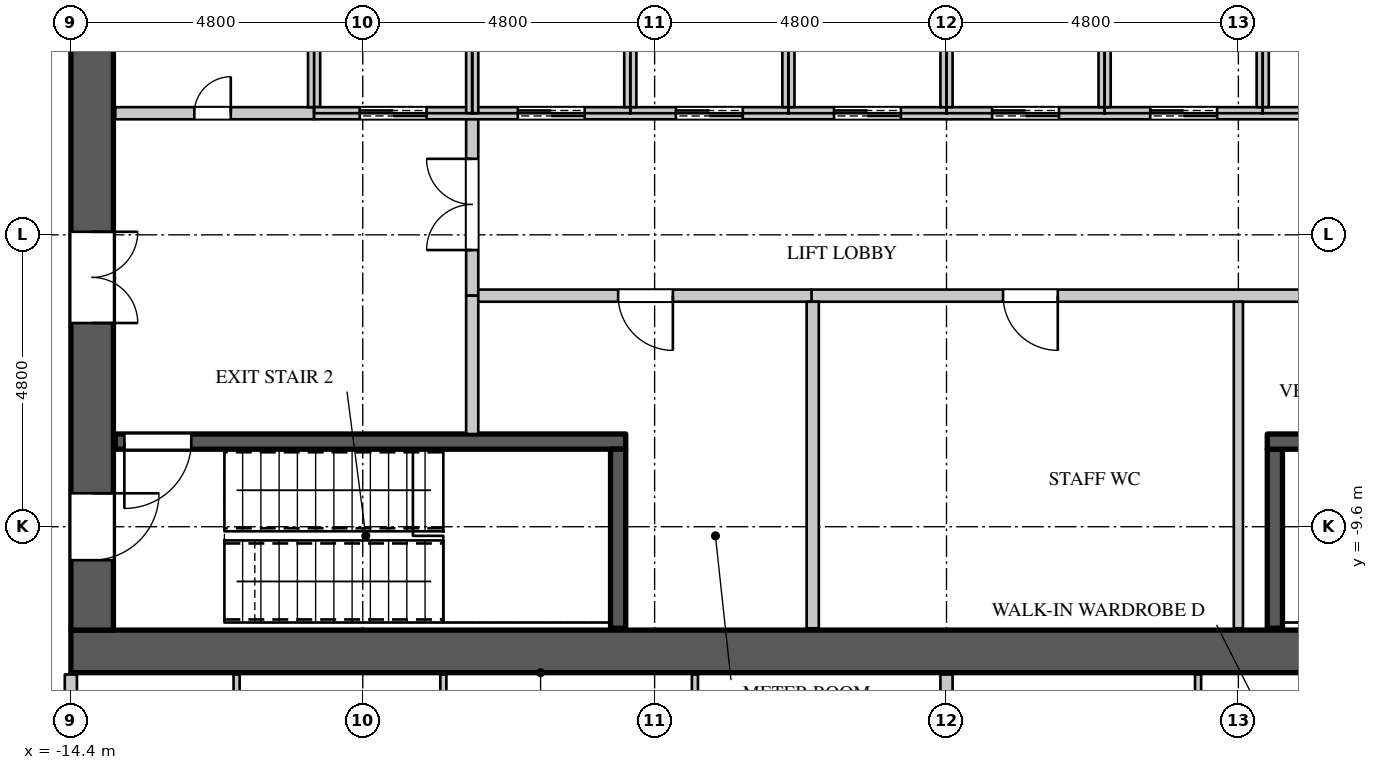
"""IFC4 building model, lengths in metres.
Left out: names, types, materials, properties, quantities, classifications, styles, units other than length and angle.
Written with IfcOpenShell. Run it as: python <this file> out.ifc"""

import sys

from ifc_helpers import new_model, si_unit, direction, frame, frame_2d, origin, place, context, subcontext, project, spatial, rectangle, extrude, element, fill, save


model = new_model("IFC4")
c1 = context("Model", 3, precision=1e-05, world=origin(), true_north=direction((0.0, 1.0)))
c2 = subcontext(c1, "Body", "Model", "MODEL_VIEW")
j1 = project(units=[si_unit("LENGTHUNIT", "METRE"), si_unit("PLANEANGLEUNIT", "RADIAN")], contexts=[c1])
p1 = place(None, origin())
s1 = spatial("IfcSite", under=j1, at=p1, CompositionType="ELEMENT")
p2 = place(p1, origin())
s2 = spatial("IfcBuilding", under=s1, at=p2, CompositionType="ELEMENT")
p3 = place(p2, frame((0.0, 0.0, 166.5)))
s3 = spatial("IfcBuildingStorey", under=s2, at=p3, CompositionType="ELEMENT", Elevation=166.5)
p4 = place(p3, frame((-14.4, -11.65, 0.0), z_axis=(0.0, 0.0, 1.0), x_axis=(1.0, 0.0, 0.0)))
e1 = element("IfcWall", 1, at=p4, inside=s3, PredefinedType="SHEAR", context=c2, shape_type="SweptSolid", body=[
    extrude(rectangle(XDim=28.8, YDim=0.7, at=frame_2d((14.4, 0.0))), origin(), (0.0, 0.0, 1.0), 4.2),
])
p5 = place(p3, frame((-14.05, -11.3, 0.0), z_axis=(0.0, 0.0, 1.0), x_axis=(0.0, 1.0, 0.0)))
e2 = element("IfcWall", 2, at=p5, inside=s3, PredefinedType="SHEAR", context=c2, shape_type="SweptSolid", body=[
    extrude(rectangle(XDim=22.6, YDim=0.7, at=frame_2d((11.3, 0.0))), origin(), (0.0, 0.0, 1.0), 4.2),
])
p6 = place(p5, frame((20.35, 0.0, 0.0)))
e3 = element("IfcOpeningElement", 3, at=p6, cuts=e2, PredefinedType="OPENING", context=c2, shape_type="SweptSolid", body=[
    extrude(rectangle(XDim=1.1, YDim=2.2, at=frame_2d((0.55, 1.1))), frame((0.0, 0.36, 0.0), z_axis=(0.0, -1.0, 0.0), x_axis=(1.0, 0.0, 0.0)), (0.0, 0.0, 1.0), 0.72),
])
p7 = place(p5, frame((1.15, 0.0, 0.0)))
e4 = element("IfcOpeningElement", 4, at=p7, cuts=e2, PredefinedType="OPENING", context=c2, shape_type="SweptSolid", body=[
    extrude(rectangle(XDim=1.1, YDim=2.2, at=frame_2d((0.55, 1.1))), frame((0.0, 0.36, 0.0), z_axis=(0.0, -1.0, 0.0), x_axis=(1.0, 0.0, 0.0)), (0.0, 0.0, 1.0), 0.72),
])
p8 = place(p5, frame((16.05, 0.0, 0.0)))
e5 = element("IfcOpeningElement", 5, at=p8, cuts=e2, PredefinedType="OPENING", context=c2, shape_type="SweptSolid", body=[
    extrude(rectangle(XDim=1.5, YDim=2.4, at=frame_2d((0.75, 1.2))), frame((0.0, 0.36, 0.0), z_axis=(0.0, -1.0, 0.0), x_axis=(1.0, 0.0, 0.0)), (0.0, 0.0, 1.0), 0.72),
])
p9 = place(p5, frame((5.05, 0.0, 0.0)))
e6 = element("IfcOpeningElement", 6, at=p9, cuts=e2, PredefinedType="OPENING", context=c2, shape_type="SweptSolid", body=[
    extrude(rectangle(XDim=1.5, YDim=2.4, at=frame_2d((0.75, 1.2))), frame((0.0, 0.36, 0.0), z_axis=(0.0, -1.0, 0.0), x_axis=(1.0, 0.0, 0.0)), (0.0, 0.0, 1.0), 0.72),
])
p10 = place(p3, frame((-14.4, -14.3, 0.0), z_axis=(0.0, 0.0, 1.0), x_axis=(0.0, 1.0, 0.0)))
e7 = element("IfcWall", 7, at=p10, inside=s3, PredefinedType="PARTITIONING", context=c2, shape_type="SweptSolid", body=[
    extrude(rectangle(XDim=2.27, YDim=0.2, at=frame_2d((1.135, 0.0))), origin(), (0.0, 0.0, 1.0), 3.95),
])
p11 = place(p3, frame((-7.8, -5.8, 0.0), z_axis=(0.0, 0.0, 1.0), x_axis=(0.0, 1.0, 0.0)))
e8 = element("IfcWall", 8, at=p11, inside=s3, PredefinedType="PARTITIONING", context=c2, shape_type="SweptSolid", body=[
    extrude(rectangle(XDim=3.0, YDim=0.2, at=frame_2d((1.5, 0.0))), origin(), (0.0, 0.0, 1.0), 3.95),
])
p12 = place(p11, frame((0.75, 0.0, 0.0)))
e9 = element("IfcOpeningElement", 9, at=p12, cuts=e8, PredefinedType="OPENING", context=c2, shape_type="SweptSolid", body=[
    extrude(rectangle(XDim=1.5, YDim=2.4, at=frame_2d((0.75, 1.2))), frame((0.0, 0.11, 0.0), z_axis=(0.0, -1.0, 0.0), x_axis=(1.0, 0.0, 0.0)), (0.0, 0.0, 1.0), 0.22),
])
p13 = place(p3, frame((-2.22, -5.8, 0.0), z_axis=(0.0, 0.0, 1.0), x_axis=(1.0, 0.0, 0.0)))
e10 = element("IfcWall", 10, at=p13, inside=s3, PredefinedType="PARTITIONING", context=c2, shape_type="SweptSolid", body=[
    extrude(rectangle(XDim=15.89, YDim=0.2, at=frame_2d((7.945, 0.0))), origin(), (0.0, 0.0, 1.0), 3.95),
])
p14 = place(p13, frame((3.15, 0.0, 0.0)))
e11 = element("IfcOpeningElement", 11, at=p14, cuts=e10, PredefinedType="OPENING", context=c2, shape_type="SweptSolid", body=[
    extrude(rectangle(XDim=0.9, YDim=2.2, at=frame_2d((0.45, 1.1))), frame((0.0, 0.11, 0.0), z_axis=(0.0, -1.0, 0.0), x_axis=(1.0, 0.0, 0.0)), (0.0, 0.0, 1.0), 0.22),
])
p15 = place(p13, frame((8.5, 0.0, 0.0)))
e12 = element("IfcOpeningElement", 12, at=p15, cuts=e10, PredefinedType="OPENING", context=c2, shape_type="SweptSolid", body=[
    extrude(rectangle(XDim=0.9, YDim=2.2, at=frame_2d((0.45, 1.1))), frame((0.0, 0.11, 0.0), z_axis=(0.0, -1.0, 0.0), x_axis=(1.0, 0.0, 0.0)), (0.0, 0.0, 1.0), 0.22),
])
p16 = place(p13, frame((12.8, 0.0, 0.0)))
e13 = element("IfcOpeningElement", 13, at=p16, cuts=e10, PredefinedType="OPENING", context=c2, shape_type="SweptSolid", body=[
    extrude(rectangle(XDim=0.9, YDim=2.2, at=frame_2d((0.45, 1.1))), frame((0.0, 0.11, 0.0), z_axis=(0.0, -1.0, 0.0), x_axis=(1.0, 0.0, 0.0)), (0.0, 0.0, 1.0), 0.22),
])
p17 = place(p3, frame((4.8, -11.27, 0.0), z_axis=(0.0, 0.0, 1.0), x_axis=(0.0, 1.0, 0.0)))
e14 = element("IfcWall", 14, at=p17, inside=s3, PredefinedType="PARTITIONING", context=c2, shape_type="SweptSolid", body=[
    extrude(rectangle(XDim=5.37, YDim=0.15, at=frame_2d((2.685, 0.0))), origin(), (0.0, 0.0, 1.0), 3.95),
])
p18 = place(p3, frame((0.0, -24.055, 0.0), z_axis=(0.0, 0.0, 1.0), x_axis=(0.0, 1.0, 0.0)))
e15 = element("IfcWall", 15, at=p18, inside=s3, PredefinedType="PARTITIONING", context=c2, shape_type="SweptSolid", body=[
    extrude(rectangle(XDim=12.025, YDim=0.2, at=frame_2d((6.012, 0.0))), origin(), (0.0, 0.0, 1.0), 3.95),
])
p19 = place(p3, frame((-13.67, -2.8, 0.0), z_axis=(0.0, 0.0, 1.0), x_axis=(1.0, 0.0, 0.0)))
e16 = element("IfcWall", 16, at=p19, inside=s3, PredefinedType="PARTITIONING", context=c2, shape_type="SweptSolid", body=[
    extrude(rectangle(XDim=3.27, YDim=0.2, at=frame_2d((1.635, 0.0))), origin(), (0.0, 0.0, 1.0), 3.95),
])
p20 = place(p19, frame((1.3, 0.0, 0.0)))
e17 = element("IfcOpeningElement", 17, at=p20, cuts=e16, PredefinedType="OPENING", context=c2, shape_type="SweptSolid", body=[
    extrude(rectangle(XDim=0.6, YDim=2.0, at=frame_2d((0.3, 1.0))), frame((0.0, 0.11, 0.0), z_axis=(0.0, -1.0, 0.0), x_axis=(1.0, 0.0, 0.0)), (0.0, 0.0, 1.0), 0.22),
])
p21 = place(p3, frame((-7.8, -8.075, 0.0), z_axis=(0.0, 0.0, 1.0), x_axis=(0.0, 1.0, 0.0)))
e18 = element("IfcWall", 18, at=p21, inside=s3, PredefinedType="PARTITIONING", context=c2, shape_type="SweptSolid", body=[
    extrude(rectangle(XDim=2.275, YDim=0.2, at=frame_2d((1.137, 0.0))), origin(), (0.0, 0.0, 1.0), 3.95),
])
p22 = place(p3, frame((-7.7, -5.8, 0.0), z_axis=(0.0, 0.0, 1.0), x_axis=(1.0, 0.0, 0.0)))
e19 = element("IfcWall", 19, at=p22, inside=s3, PredefinedType="PARTITIONING", context=c2, shape_type="SweptSolid", body=[
    extrude(rectangle(XDim=5.48, YDim=0.2, at=frame_2d((2.74, 0.0))), origin(), (0.0, 0.0, 1.0), 3.95),
])
p23 = place(p22, frame((2.3, 0.0, 0.0)))
e20 = element("IfcOpeningElement", 20, at=p23, cuts=e19, PredefinedType="OPENING", context=c2, shape_type="SweptSolid", body=[
    extrude(rectangle(XDim=0.9, YDim=2.2, at=frame_2d((0.45, 1.1))), frame((0.0, 0.11, 0.0), z_axis=(0.0, -1.0, 0.0), x_axis=(1.0, 0.0, 0.0)), (0.0, 0.0, 1.0), 0.22),
])
p24 = place(p3, frame((-2.2, -11.27, 0.0), z_axis=(0.0, 0.0, 1.0), x_axis=(0.0, 1.0, 0.0)))
e21 = element("IfcWall", 21, at=p24, inside=s3, PredefinedType="PARTITIONING", context=c2, shape_type="SweptSolid", body=[
    extrude(rectangle(XDim=5.37, YDim=0.2, at=frame_2d((2.685, 0.0))), origin(), (0.0, 0.0, 1.0), 3.95),
])
p25 = place(p3, frame((-10.4, -2.7, 0.0), z_axis=(0.0, 0.0, 1.0), x_axis=(0.0, 1.0, 0.0)))
e22 = element("IfcWall", 22, at=p25, inside=s3, PredefinedType="PARTITIONING", context=c2, shape_type="SweptSolid", body=[
    extrude(rectangle(XDim=2.7, YDim=0.2, at=frame_2d((1.35, 0.0))), origin(), (0.0, 0.0, 1.0), 3.95),
])
p26 = place(p3, frame((-10.4, -2.8, 0.0), z_axis=(0.0, 0.0, 1.0), x_axis=(1.0, 0.0, 0.0)))
e23 = element("IfcWall", 23, at=p26, inside=s3, PredefinedType="PARTITIONING", context=c2, shape_type="SweptSolid", body=[
    extrude(rectangle(XDim=18.2, YDim=0.2, at=frame_2d((9.1, 0.0))), origin(), (0.0, 0.0, 1.0), 3.95),
])
p27 = place(p26, frame((0.75, 0.0, 0.0)))
e24 = element("IfcOpeningElement", 24, at=p27, cuts=e23, PredefinedType="OPENING", context=c2, shape_type="SweptSolid", body=[
    extrude(rectangle(XDim=1.1, YDim=2.2, at=frame_2d((0.55, 1.1))), frame((0.0, 0.11, 0.0), z_axis=(0.0, -1.0, 0.0), x_axis=(1.0, 0.0, 0.0)), (0.0, 0.0, 1.0), 0.22),
])
p28 = place(p26, frame((3.35, 0.0, 0.0)))
e25 = element("IfcOpeningElement", 25, at=p28, cuts=e23, PredefinedType="OPENING", context=c2, shape_type="SweptSolid", body=[
    extrude(rectangle(XDim=1.1, YDim=2.2, at=frame_2d((0.55, 1.1))), frame((0.0, 0.11, 0.0), z_axis=(0.0, -1.0, 0.0), x_axis=(1.0, 0.0, 0.0)), (0.0, 0.0, 1.0), 0.22),
])
p29 = place(p26, frame((5.95, 0.0, 0.0)))
e26 = element("IfcOpeningElement", 26, at=p29, cuts=e23, PredefinedType="OPENING", context=c2, shape_type="SweptSolid", body=[
    extrude(rectangle(XDim=1.1, YDim=2.2, at=frame_2d((0.55, 1.1))), frame((0.0, 0.11, 0.0), z_axis=(0.0, -1.0, 0.0), x_axis=(1.0, 0.0, 0.0)), (0.0, 0.0, 1.0), 0.22),
])
p30 = place(p26, frame((8.55, 0.0, 0.0)))
e27 = element("IfcOpeningElement", 27, at=p30, cuts=e23, PredefinedType="OPENING", context=c2, shape_type="SweptSolid", body=[
    extrude(rectangle(XDim=1.1, YDim=2.2, at=frame_2d((0.55, 1.1))), frame((0.0, 0.11, 0.0), z_axis=(0.0, -1.0, 0.0), x_axis=(1.0, 0.0, 0.0)), (0.0, 0.0, 1.0), 0.22),
])
p31 = place(p26, frame((11.15, 0.0, 0.0)))
e28 = element("IfcOpeningElement", 28, at=p31, cuts=e23, PredefinedType="OPENING", context=c2, shape_type="SweptSolid", body=[
    extrude(rectangle(XDim=1.1, YDim=2.2, at=frame_2d((0.55, 1.1))), frame((0.0, 0.11, 0.0), z_axis=(0.0, -1.0, 0.0), x_axis=(1.0, 0.0, 0.0)), (0.0, 0.0, 1.0), 0.22),
])
p32 = place(p26, frame((13.75, 0.0, 0.0)))
e29 = element("IfcOpeningElement", 29, at=p32, cuts=e23, PredefinedType="OPENING", context=c2, shape_type="SweptSolid", body=[
    extrude(rectangle(XDim=1.1, YDim=2.2, at=frame_2d((0.55, 1.1))), frame((0.0, 0.11, 0.0), z_axis=(0.0, -1.0, 0.0), x_axis=(1.0, 0.0, 0.0)), (0.0, 0.0, 1.0), 0.22),
])
p33 = place(p26, frame((16.35, 0.0, 0.0)))
e30 = element("IfcOpeningElement", 30, at=p33, cuts=e23, PredefinedType="OPENING", context=c2, shape_type="SweptSolid", body=[
    extrude(rectangle(XDim=1.1, YDim=2.2, at=frame_2d((0.55, 1.1))), frame((0.0, 0.11, 0.0), z_axis=(0.0, -1.0, 0.0), x_axis=(1.0, 0.0, 0.0)), (0.0, 0.0, 1.0), 0.22),
])
p34 = place(p3, frame((-7.8, -2.8, 0.0), z_axis=(0.0, 0.0, 1.0), x_axis=(0.0, 1.0, 0.0)))
e31 = element("IfcWall", 31, at=p34, inside=s3, PredefinedType="PARTITIONING", context=c2, shape_type="SweptSolid", body=[
    extrude(rectangle(XDim=2.8, YDim=0.2, at=frame_2d((1.4, 0.0))), origin(), (0.0, 0.0, 1.0), 3.95),
])
for number, where, z_axis, x_axis in (
    (32, (-5.2, -2.7, 0.0), (0.0, 0.0, 1.0), (0.0, 1.0, 0.0)),
    (33, (-2.6, -2.7, 0.0), (0.0, 0.0, 1.0), (0.0, 1.0, 0.0)),
    (34, (0.0, -2.7, 0.0), (0.0, 0.0, 1.0), (0.0, 1.0, 0.0)),
    (35, (2.6, -2.7, 0.0), (0.0, 0.0, 1.0), (0.0, 1.0, 0.0)),
    (36, (5.2, -2.7, 0.0), (0.0, 0.0, 1.0), (0.0, 1.0, 0.0)),
):
    element("IfcWall", number, at=place(p3, frame(where, z_axis=z_axis, x_axis=x_axis)), inside=s3, PredefinedType="PARTITIONING", context=c2, shape_type="SweptSolid", body=[
        extrude(rectangle(XDim=2.6, YDim=0.2, at=frame_2d((1.3, 0.0))), origin(), (0.0, 0.0, 1.0), 3.95),
    ])
p35 = place(p3, frame((-13.67, -8.2, 0.0), z_axis=(0.0, 0.0, 1.0), x_axis=(1.0, 0.0, 0.0)))
e37 = element("IfcWall", 37, at=p35, inside=s3, PredefinedType="SHEAR", context=c2, shape_type="SweptSolid", body=[
    extrude(rectangle(XDim=8.395, YDim=0.25, at=frame_2d((4.198, 0.0))), origin(), (0.0, 0.0, 1.0), 3.95),
])
p36 = place(p35, frame((0.15, 0.0, 0.0)))
e38 = element("IfcOpeningElement", 38, at=p36, cuts=e37, PredefinedType="OPENING", context=c2, shape_type="SweptSolid", body=[
    extrude(rectangle(XDim=1.1, YDim=2.2, at=frame_2d((0.55, 1.1))), frame((0.0, 0.135, 0.0), z_axis=(0.0, -1.0, 0.0), x_axis=(1.0, 0.0, 0.0)), (0.0, 0.0, 1.0), 0.27),
])
for number, where, z_axis, x_axis in (
    (39, (-5.4, -11.27, 0.0), (0.0, 0.0, 1.0), (0.0, 1.0, 0.0)),
    (40, (5.4, -11.27, 0.0), (0.0, 0.0, 1.0), (0.0, 1.0, 0.0)),
):
    element("IfcWall", number, at=place(p3, frame(where, z_axis=z_axis, x_axis=x_axis)), inside=s3, PredefinedType="SHEAR", context=c2, shape_type="SweptSolid", body=[
        extrude(rectangle(XDim=2.945, YDim=0.25, at=frame_2d((1.473, 0.0))), origin(), (0.0, 0.0, 1.0), 3.95),
    ])
p37 = place(p3, frame((5.275, -8.2, 0.0), z_axis=(0.0, 0.0, 1.0), x_axis=(1.0, 0.0, 0.0)))
e41 = element("IfcWall", 41, at=p37, inside=s3, PredefinedType="SHEAR", context=c2, shape_type="SweptSolid", body=[
    extrude(rectangle(XDim=8.395, YDim=0.25, at=frame_2d((4.198, 0.0))), origin(), (0.0, 0.0, 1.0), 3.95),
])
p38 = place(p3, frame((-11.675, -14.925, 0.0), z_axis=(0.0, 0.0, 1.0), x_axis=(0.0, 1.0, 0.0)))
e42 = element("IfcWall", 42, at=p38, inside=s3, PredefinedType="PARTITIONING", context=c2, shape_type="SweptSolid", body=[
    extrude(rectangle(XDim=2.895, YDim=0.1, at=frame_2d((1.448, 0.0))), origin(), (0.0, 0.0, 1.0), 3.95),
])
p39 = place(p38, frame((0.95, 0.0, 0.0)))
e43 = element("IfcOpeningElement", 43, at=p39, cuts=e42, PredefinedType="OPENING", context=c2, shape_type="SweptSolid", body=[
    extrude(rectangle(XDim=0.9, YDim=2.2, at=frame_2d((0.45, 1.1))), frame((0.0, 0.06, 0.0), z_axis=(0.0, -1.0, 0.0), x_axis=(1.0, 0.0, 0.0)), (0.0, 0.0, 1.0), 0.12),
])
p40 = place(p3, frame((-8.274, -14.98, 0.0), z_axis=(0.0, 0.0, 1.0), x_axis=(0.0, 1.0, 0.0)))
e44 = element("IfcWall", 44, at=p40, inside=s3, PredefinedType="PARTITIONING", context=c2, shape_type="SweptSolid", body=[
    extrude(rectangle(XDim=2.95, YDim=0.1, at=frame_2d((1.475, 0.0))), origin(), (0.0, 0.0, 1.0), 3.95),
])
for number, where, z_axis, x_axis in (
    (45, (-4.137, -17.325, 0.0), (0.0, 0.0, 1.0), (0.0, 1.0, 0.0)),
    (46, (4.137, -17.325, 0.0), (0.0, 0.0, 1.0), (0.0, 1.0, 0.0)),
):
    element("IfcWall", number, at=place(p3, frame(where, z_axis=z_axis, x_axis=x_axis)), inside=s3, PredefinedType="PARTITIONING", context=c2, shape_type="SweptSolid", body=[
        extrude(rectangle(XDim=5.295, YDim=0.1, at=frame_2d((2.647, 0.0))), origin(), (0.0, 0.0, 1.0), 3.35),
    ])
p41 = place(p20, origin())
e47 = element("IfcDoor", 47, at=p41, inside=s3, OperationType="SINGLE_SWING_RIGHT", PredefinedType="DOOR", context=c2, shape_type="SweptSolid", body=[
    extrude(rectangle(XDim=0.6, YDim=2.0, at=frame_2d((0.3, 1.0))), frame((0.0, 0.025, 0.0), z_axis=(0.0, -1.0, 0.0), x_axis=(1.0, 0.0, 0.0)), (0.0, 0.0, 1.0), 0.05),
])
fill(e17, e47)
p42 = place(p23, origin())
e48 = element("IfcDoor", 48, at=p42, inside=s3, OperationType="SINGLE_SWING_LEFT", PredefinedType="DOOR", context=c2, shape_type="SweptSolid", body=[
    extrude(rectangle(XDim=0.9, YDim=2.2, at=frame_2d((0.45, 1.1))), frame((0.0, 0.025, 0.0), z_axis=(0.0, -1.0, 0.0), x_axis=(1.0, 0.0, 0.0)), (0.0, 0.0, 1.0), 0.05),
])
fill(e20, e48)
p43 = place(p14, origin())
e49 = element("IfcDoor", 49, at=p43, inside=s3, OperationType="SINGLE_SWING_LEFT", PredefinedType="DOOR", context=c2, shape_type="SweptSolid", body=[
    extrude(rectangle(XDim=0.9, YDim=2.2, at=frame_2d((0.45, 1.1))), frame((0.0, 0.025, 0.0), z_axis=(0.0, -1.0, 0.0), x_axis=(1.0, 0.0, 0.0)), (0.0, 0.0, 1.0), 0.05),
])
fill(e11, e49)
p44 = place(p27, origin())
e50 = element("IfcDoor", 50, at=p44, inside=s3, OperationType="DOUBLE_DOOR_SLIDING", PredefinedType="DOOR", context=c2, shape_type="SweptSolid", body=[
    extrude(rectangle(XDim=1.1, YDim=2.2, at=frame_2d((0.55, 1.1))), frame((0.0, 0.025, 0.0), z_axis=(0.0, -1.0, 0.0), x_axis=(1.0, 0.0, 0.0)), (0.0, 0.0, 1.0), 0.05),
])
fill(e24, e50)
p45 = place(p28, origin())
e51 = element("IfcDoor", 51, at=p45, inside=s3, OperationType="DOUBLE_DOOR_SLIDING", PredefinedType="DOOR", context=c2, shape_type="SweptSolid", body=[
    extrude(rectangle(XDim=1.1, YDim=2.2, at=frame_2d((0.55, 1.1))), frame((0.0, 0.025, 0.0), z_axis=(0.0, -1.0, 0.0), x_axis=(1.0, 0.0, 0.0)), (0.0, 0.0, 1.0), 0.05),
])
fill(e25, e51)
p46 = place(p29, origin())
e52 = element("IfcDoor", 52, at=p46, inside=s3, OperationType="DOUBLE_DOOR_SLIDING", PredefinedType="DOOR", context=c2, shape_type="SweptSolid", body=[
    extrude(rectangle(XDim=1.1, YDim=2.2, at=frame_2d((0.55, 1.1))), frame((0.0, 0.025, 0.0), z_axis=(0.0, -1.0, 0.0), x_axis=(1.0, 0.0, 0.0)), (0.0, 0.0, 1.0), 0.05),
])
fill(e26, e52)
p47 = place(p30, origin())
e53 = element("IfcDoor", 53, at=p47, inside=s3, OperationType="DOUBLE_DOOR_SLIDING", PredefinedType="DOOR", context=c2, shape_type="SweptSolid", body=[
    extrude(rectangle(XDim=1.1, YDim=2.2, at=frame_2d((0.55, 1.1))), frame((0.0, 0.025, 0.0), z_axis=(0.0, -1.0, 0.0), x_axis=(1.0, 0.0, 0.0)), (0.0, 0.0, 1.0), 0.05),
])
fill(e27, e53)
p48 = place(p31, origin())
e54 = element("IfcDoor", 54, at=p48, inside=s3, OperationType="DOUBLE_DOOR_SLIDING", PredefinedType="DOOR", context=c2, shape_type="SweptSolid", body=[
    extrude(rectangle(XDim=1.1, YDim=2.2, at=frame_2d((0.55, 1.1))), frame((0.0, 0.025, 0.0), z_axis=(0.0, -1.0, 0.0), x_axis=(1.0, 0.0, 0.0)), (0.0, 0.0, 1.0), 0.05),
])
fill(e28, e54)
p49 = place(p32, origin())
e55 = element("IfcDoor", 55, at=p49, inside=s3, OperationType="DOUBLE_DOOR_SLIDING", PredefinedType="DOOR", context=c2, shape_type="SweptSolid", body=[
    extrude(rectangle(XDim=1.1, YDim=2.2, at=frame_2d((0.55, 1.1))), frame((0.0, 0.025, 0.0), z_axis=(0.0, -1.0, 0.0), x_axis=(1.0, 0.0, 0.0)), (0.0, 0.0, 1.0), 0.05),
])
fill(e29, e55)
p50 = place(p36, origin())
e56 = element("IfcDoor", 56, at=p50, inside=s3, OperationType="SINGLE_SWING_RIGHT", PredefinedType="DOOR", context=c2, shape_type="SweptSolid", body=[
    extrude(rectangle(XDim=1.1, YDim=2.2, at=frame_2d((0.55, 1.1))), frame((0.0, 0.025, 0.0), z_axis=(0.0, -1.0, 0.0), x_axis=(1.0, 0.0, 0.0)), (0.0, 0.0, 1.0), 0.05),
])
fill(e38, e56)
p51 = place(p12, origin())
e57 = element("IfcDoor", 57, at=p51, inside=s3, OperationType="DOUBLE_DOOR_SINGLE_SWING", PredefinedType="DOOR", context=c2, shape_type="SweptSolid", body=[
    extrude(rectangle(XDim=1.5, YDim=2.4, at=frame_2d((0.75, 1.2))), frame((0.0, 0.025, 0.0), z_axis=(0.0, -1.0, 0.0), x_axis=(1.0, 0.0, 0.0)), (0.0, 0.0, 1.0), 0.05),
])
fill(e9, e57)
p52 = place(p7, origin())
e58 = element("IfcDoor", 58, at=p52, inside=s3, OperationType="SINGLE_SWING_LEFT", PredefinedType="DOOR", context=c2, shape_type="SweptSolid", body=[
    extrude(rectangle(XDim=1.1, YDim=2.2, at=frame_2d((0.55, 1.1))), frame((0.0, -0.295, 0.0), z_axis=(0.0, -1.0, 0.0), x_axis=(1.0, 0.0, 0.0)), (0.0, 0.0, 1.0), 0.05),
])
fill(e4, e58)
p53 = place(p9, origin())
e59 = element("IfcDoor", 59, at=p53, inside=s3, OperationType="DOUBLE_DOOR_SINGLE_SWING", PredefinedType="DOOR", context=c2, shape_type="SweptSolid", body=[
    extrude(rectangle(XDim=1.5, YDim=2.4, at=frame_2d((0.75, 1.2))), frame((0.0, -0.295, 0.0), z_axis=(0.0, -1.0, 0.0), x_axis=(1.0, 0.0, 0.0)), (0.0, 0.0, 1.0), 0.05),
])
fill(e6, e59)
save(model, sys.argv[1])
